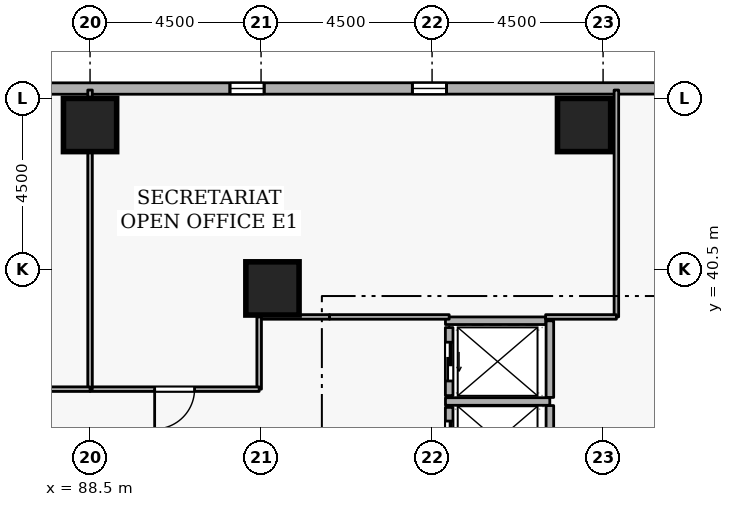
"""IFC4 building model, lengths in metres.
Left out: names, types, materials, properties, quantities, classifications, styles, units other than length and angle.
Written with IfcOpenShell. Run it as: python <this file> out.ifc"""

import sys

from ifc_helpers import new_model, si_unit, direction, frame, frame_2d, origin, origin_2d, place, context, subcontext, project, spatial, rectangle, extrude, element, fill, save


model = new_model("IFC4")
c1 = context("Model", 3, precision=1e-05, world=origin(), true_north=direction((0.0, 1.0)))
c2 = subcontext(c1, "Body", "Model", "MODEL_VIEW")
j1 = project(units=[si_unit("LENGTHUNIT", "METRE"), si_unit("PLANEANGLEUNIT", "RADIAN")], contexts=[c1])
p1 = place(None, origin())
s1 = spatial("IfcSite", under=j1, at=p1, CompositionType="ELEMENT")
p2 = place(p1, origin())
s2 = spatial("IfcBuilding", under=s1, at=p2, CompositionType="ELEMENT")
p3 = place(p2, frame((0.0, 0.0, 38.7)))
s3 = spatial("IfcBuildingStorey", under=s2, at=p3, CompositionType="ELEMENT", Elevation=38.7)
for number, where, z_axis, x_axis in (
    (1, (101.5, 44.3, 0.0), (0.0, 0.0, 1.0), (1.0, 0.0, 0.0)),
    (2, (88.5, 44.3, 0.0), (0.0, 0.0, 1.0), (1.0, 0.0, 0.0)),
    (3, (93.3, 40.0, 0.0), (0.0, 0.0, 1.0), (1.0, 0.0, 0.0)),
):
    element("IfcColumn", number, at=place(p3, frame(where, z_axis=z_axis, x_axis=x_axis)), inside=s3, PredefinedType="COLUMN", context=c2, shape_type="SweptSolid", body=[
        extrude(rectangle(XDim=1.4, YDim=1.4, at=origin_2d()), origin(), (0.0, 0.0, 1.0), 3.6),
    ])
p4 = place(p3, frame((110.181, 45.265, 0.0), z_axis=(0.0, 0.0, 1.0), x_axis=(-0.999999969775, -0.000245864205, 0.0)))
e4 = element("IfcWall", 4, at=p4, inside=s3, PredefinedType="STANDARD", context=c2, shape_type="SweptSolid", body=[
    extrude(rectangle(XDim=34.755, YDim=0.3, at=frame_2d((17.377, 0.0))), origin(), (0.0, 0.0, 1.0), 2.7),
])
p5 = place(p4, frame((2.7, 0.0, 0.72)))
e5 = element("IfcOpeningElement", 5, at=p5, cuts=e4, PredefinedType="OPENING", context=c2, shape_type="SweptSolid", body=[
    extrude(rectangle(XDim=0.9, YDim=1.75, at=frame_2d((0.45, 0.875))), frame((0.0, 0.16, 0.0), z_axis=(0.0, -1.0, 0.0), x_axis=(1.0, 0.0, 0.0)), (0.0, 0.0, 1.0), 0.32),
])
p6 = place(p4, frame((12.3, 0.0, 0.72)))
e6 = element("IfcOpeningElement", 6, at=p6, cuts=e4, PredefinedType="OPENING", context=c2, shape_type="SweptSolid", body=[
    extrude(rectangle(XDim=0.9, YDim=1.75, at=frame_2d((0.45, 0.875))), frame((0.0, 0.16, 0.0), z_axis=(0.0, -1.0, 0.0), x_axis=(1.0, 0.0, 0.0)), (0.0, 0.0, 1.0), 0.32),
])
p7 = place(p4, frame((17.1, 0.0, 0.72)))
e7 = element("IfcOpeningElement", 7, at=p7, cuts=e4, PredefinedType="OPENING", context=c2, shape_type="SweptSolid", body=[
    extrude(rectangle(XDim=0.9, YDim=1.75, at=frame_2d((0.45, 0.875))), frame((0.0, 0.16, 0.0), z_axis=(0.0, -1.0, 0.0), x_axis=(1.0, 0.0, 0.0)), (0.0, 0.0, 1.0), 0.32),
])
p8 = place(p4, frame((26.7, 0.0, 0.72)))
e8 = element("IfcOpeningElement", 8, at=p8, cuts=e4, PredefinedType="OPENING", context=c2, shape_type="SweptSolid", body=[
    extrude(rectangle(XDim=0.9, YDim=1.75, at=frame_2d((0.45, 0.875))), frame((0.0, 0.16, 0.0), z_axis=(0.0, -1.0, 0.0), x_axis=(1.0, 0.0, 0.0)), (0.0, 0.0, 1.0), 0.32),
])
p9 = place(p4, frame((31.5, 0.0, 0.72)))
e9 = element("IfcOpeningElement", 9, at=p9, cuts=e4, PredefinedType="OPENING", context=c2, shape_type="SweptSolid", body=[
    extrude(rectangle(XDim=0.9, YDim=1.75, at=frame_2d((0.45, 0.875))), frame((0.0, 0.16, 0.0), z_axis=(0.0, -1.0, 0.0), x_axis=(1.0, 0.0, 0.0)), (0.0, 0.0, 1.0), 0.32),
])
p10 = place(p3, frame((97.95, 36.87, 0.0), z_axis=(0.0, 0.0, 1.0), x_axis=(0.0, -1.0, 0.0)))
e10 = element("IfcWall", 10, at=p10, inside=s3, PredefinedType="STANDARD", context=c2, shape_type="SweptSolid", body=[
    extrude(rectangle(XDim=1.74, YDim=0.2, at=frame_2d((0.87, 0.0))), origin(), (0.0, 0.0, 1.0), 3.34),
])
p11 = place(p10, frame((0.36, 0.0, 0.0)))
e11 = element("IfcOpeningElement", 11, at=p11, cuts=e10, PredefinedType="OPENING", context=c2, shape_type="SweptSolid", body=[
    extrude(rectangle(XDim=1.02, YDim=2.06, at=frame_2d((0.51, 1.03))), frame((0.0, 0.11, 0.0), z_axis=(0.0, -1.0, 0.0), x_axis=(1.0, 0.0, 0.0)), (0.0, 0.0, 1.0), 0.22),
])
p12 = place(p3, frame((97.95, 38.97, 0.0), z_axis=(0.0, 0.0, 1.0), x_axis=(0.0, -1.0, 0.0)))
e12 = element("IfcWall", 12, at=p12, inside=s3, PredefinedType="STANDARD", context=c2, shape_type="SweptSolid", body=[
    extrude(rectangle(XDim=1.79, YDim=0.2, at=frame_2d((0.895, 0.0))), origin(), (0.0, 0.0, 1.0), 3.34),
])
p13 = place(p12, frame((0.385, 0.0, 0.0)))
e13 = element("IfcOpeningElement", 13, at=p13, cuts=e12, PredefinedType="OPENING", context=c2, shape_type="SweptSolid", body=[
    extrude(rectangle(XDim=1.02, YDim=2.06, at=frame_2d((0.51, 1.03))), frame((0.0, 0.11, 0.0), z_axis=(0.0, -1.0, 0.0), x_axis=(1.0, 0.0, 0.0)), (0.0, 0.0, 1.0), 0.22),
])
p14 = place(p3, frame((97.852, 37.025, 0.0), z_axis=(0.0, 0.0, 1.0), x_axis=(1.0, 0.0, 0.0)))
e14 = element("IfcWall", 14, at=p14, inside=s3, PredefinedType="STANDARD", context=c2, shape_type="SweptSolid", body=[
    extrude(rectangle(XDim=2.746, YDim=0.2, at=frame_2d((1.373, 0.0))), origin(), (0.0, 0.0, 1.0), 3.34),
])
p15 = place(p3, frame((100.6, 35.062, 0.0), z_axis=(0.0, 0.0, 1.0), x_axis=(0.0, 1.0, 0.0)))
e15 = element("IfcWall", 15, at=p15, inside=s3, PredefinedType="STANDARD", context=c2, shape_type="SweptSolid", body=[
    extrude(rectangle(XDim=1.856, YDim=0.2, at=frame_2d((0.928, 0.0))), origin(), (0.0, 0.0, 1.0), 3.34),
])
p16 = place(p3, frame((100.6, 37.132, 0.0), z_axis=(0.0, 0.0, 1.0), x_axis=(0.0, 1.0, 0.0)))
e16 = element("IfcWall", 16, at=p16, inside=s3, PredefinedType="STANDARD", context=c2, shape_type="SweptSolid", body=[
    extrude(rectangle(XDim=2.016, YDim=0.2, at=frame_2d((1.008, 0.0))), origin(), (0.0, 0.0, 1.0), 3.34),
])
p17 = place(p3, frame((97.852, 39.15, 0.0), z_axis=(0.0, 0.0, 1.0), x_axis=(1.0, 0.0, 0.0)))
e17 = element("IfcWall", 17, at=p17, inside=s3, PredefinedType="STANDARD", context=c2, shape_type="SweptSolid", body=[
    extrude(rectangle(XDim=2.636, YDim=0.2, at=frame_2d((1.318, 0.0))), origin(), (0.0, 0.0, 1.0), 3.34),
])
p18 = place(p3, frame((97.95, 39.25, 0.0), z_axis=(0.0, 0.0, 1.0), x_axis=(-1.0, 0.0, 0.0)))
e18 = element("IfcWall", 18, at=p18, inside=s3, PredefinedType="PARTITIONING", context=c2, shape_type="SweptSolid", body=[
    extrude(rectangle(XDim=3.15, YDim=0.12, at=frame_2d((1.575, 0.0))), origin(), (0.0, 0.0, 1.0), 3.34),
])
p19 = place(p3, frame((94.8, 39.25, 0.0), z_axis=(0.0, 0.0, 1.0), x_axis=(-1.0, 0.0, 0.0)))
e19 = element("IfcWall", 19, at=p19, inside=s3, PredefinedType="PARTITIONING", context=c2, shape_type="SweptSolid", body=[
    extrude(rectangle(XDim=1.85, YDim=0.12, at=frame_2d((0.925, 0.0))), origin(), (0.0, 0.0, 1.0), 3.34),
])
p20 = place(p3, frame((92.95, 39.25, 0.0), z_axis=(0.0, 0.0, 1.0), x_axis=(0.0, -1.0, 0.0)))
e20 = element("IfcWall", 20, at=p20, inside=s3, PredefinedType="PARTITIONING", context=c2, shape_type="SweptSolid", body=[
    extrude(rectangle(XDim=1.9, YDim=0.12, at=frame_2d((0.95, 0.0))), origin(), (0.0, 0.0, 1.0), 3.34),
])
p21 = place(p3, frame((92.95, 37.35, 0.0), z_axis=(0.0, 0.0, 1.0), x_axis=(-1.0, 0.0, 0.0)))
e21 = element("IfcWall", 21, at=p21, inside=s3, PredefinedType="PARTITIONING", context=c2, shape_type="SweptSolid", body=[
    extrude(rectangle(XDim=4.45, YDim=0.12, at=frame_2d((2.225, 0.0))), origin(), (0.0, 0.0, 1.0), 3.34),
])
p22 = place(p21, frame((1.7, 0.0, 0.0)))
e22 = element("IfcOpeningElement", 22, at=p22, cuts=e21, PredefinedType="OPENING", context=c2, shape_type="SweptSolid", body=[
    extrude(rectangle(XDim=1.05, YDim=2.1, at=frame_2d((0.525, 1.05))), frame((0.0, 0.07, 0.0), z_axis=(0.0, -1.0, 0.0), x_axis=(1.0, 0.0, 0.0)), (0.0, 0.0, 1.0), 0.14),
])
p23 = place(p3, frame((88.5, 37.35, 0.0), z_axis=(0.0, 0.0, 1.0), x_axis=(0.0, 1.0, 0.0)))
e23 = element("IfcWall", 23, at=p23, inside=s3, PredefinedType="PARTITIONING", context=c2, shape_type="SweptSolid", body=[
    extrude(rectangle(XDim=7.87, YDim=0.12, at=frame_2d((3.935, 0.0))), origin(), (0.0, 0.0, 1.0), 2.882),
])
p24 = place(p3, frame((102.35, 45.22, 0.0), z_axis=(0.0, 0.0, 1.0), x_axis=(0.0, -1.0, 0.0)))
e24 = element("IfcWall", 24, at=p24, inside=s3, PredefinedType="PARTITIONING", context=c2, shape_type="SweptSolid", body=[
    extrude(rectangle(XDim=5.97, YDim=0.12, at=frame_2d((2.985, 0.0))), origin(), (0.0, 0.0, 1.0), 3.34),
])
p25 = place(p3, frame((102.35, 39.25, 0.0), z_axis=(0.0, 0.0, 1.0), x_axis=(-1.0, 0.0, 0.0)))
e25 = element("IfcWall", 25, at=p25, inside=s3, PredefinedType="PARTITIONING", context=c2, shape_type="SweptSolid", body=[
    extrude(rectangle(XDim=1.862, YDim=0.12, at=frame_2d((0.931, 0.0))), origin(), (0.0, 0.0, 1.0), 3.34),
])
p26 = place(p3, frame((88.5, 37.35, 0.0), z_axis=(0.0, 0.0, 1.0), x_axis=(-1.0, 0.0, 0.0)))
e26 = element("IfcWall", 26, at=p26, inside=s3, PredefinedType="PARTITIONING", context=c2, shape_type="SweptSolid", body=[
    extrude(rectangle(XDim=3.15, YDim=0.12, at=frame_2d((1.575, 0.0))), origin(), (0.0, 0.0, 1.0), 3.34),
])
p27 = place(p26, frame((1.1, 0.0, 0.0)))
e27 = element("IfcOpeningElement", 27, at=p27, cuts=e26, PredefinedType="OPENING", context=c2, shape_type="SweptSolid", body=[
    extrude(rectangle(XDim=0.95, YDim=2.1, at=frame_2d((0.475, 1.05))), frame((0.0, 0.07, 0.0), z_axis=(0.0, -1.0, 0.0), x_axis=(1.0, 0.0, 0.0)), (0.0, 0.0, 1.0), 0.14),
])
p28 = place(p6, origin())
e28 = element("IfcWindow", 28, at=p28, inside=s3, PartitioningType="SINGLE_PANEL", PredefinedType="WINDOW", context=c2, shape_type="SweptSolid", body=[
    extrude(rectangle(XDim=0.9, YDim=1.75, at=frame_2d((0.45, 0.875))), frame((0.0, 0.03, 0.0), z_axis=(0.0, -1.0, 0.0), x_axis=(1.0, 0.0, 0.0)), (0.0, 0.0, 1.0), 0.06),
])
fill(e6, e28)
p29 = place(p7, origin())
e29 = element("IfcWindow", 29, at=p29, inside=s3, PartitioningType="SINGLE_PANEL", PredefinedType="WINDOW", context=c2, shape_type="SweptSolid", body=[
    extrude(rectangle(XDim=0.9, YDim=1.75, at=frame_2d((0.45, 0.875))), frame((0.0, 0.03, 0.0), z_axis=(0.0, -1.0, 0.0), x_axis=(1.0, 0.0, 0.0)), (0.0, 0.0, 1.0), 0.06),
])
fill(e7, e29)
p30 = place(p11, origin())
e30 = element("IfcDoor", 30, at=p30, inside=s3, OperationType="SLIDING_TO_LEFT", PredefinedType="DOOR", context=c2, shape_type="SweptSolid", body=[
    extrude(rectangle(XDim=1.02, YDim=2.06, at=frame_2d((0.51, 1.03))), frame((0.0, 0.025, 0.0), z_axis=(0.0, -1.0, 0.0), x_axis=(1.0, 0.0, 0.0)), (0.0, 0.0, 1.0), 0.05),
])
fill(e11, e30)
p31 = place(p13, origin())
e31 = element("IfcDoor", 31, at=p31, inside=s3, OperationType="SLIDING_TO_LEFT", PredefinedType="DOOR", context=c2, shape_type="SweptSolid", body=[
    extrude(rectangle(XDim=1.02, YDim=2.06, at=frame_2d((0.51, 1.03))), frame((0.0, 0.025, 0.0), z_axis=(0.0, -1.0, 0.0), x_axis=(1.0, 0.0, 0.0)), (0.0, 0.0, 1.0), 0.05),
])
fill(e13, e31)
p32 = place(p22, origin())
e32 = element("IfcDoor", 32, at=p32, inside=s3, OperationType="SINGLE_SWING_RIGHT", PredefinedType="DOOR", context=c2, shape_type="SweptSolid", body=[
    extrude(rectangle(XDim=1.05, YDim=2.1, at=frame_2d((0.525, 1.05))), frame((0.0, 0.025, 0.0), z_axis=(0.0, -1.0, 0.0), x_axis=(1.0, 0.0, 0.0)), (0.0, 0.0, 1.0), 0.05),
])
fill(e22, e32)
save(model, sys.argv[1])
